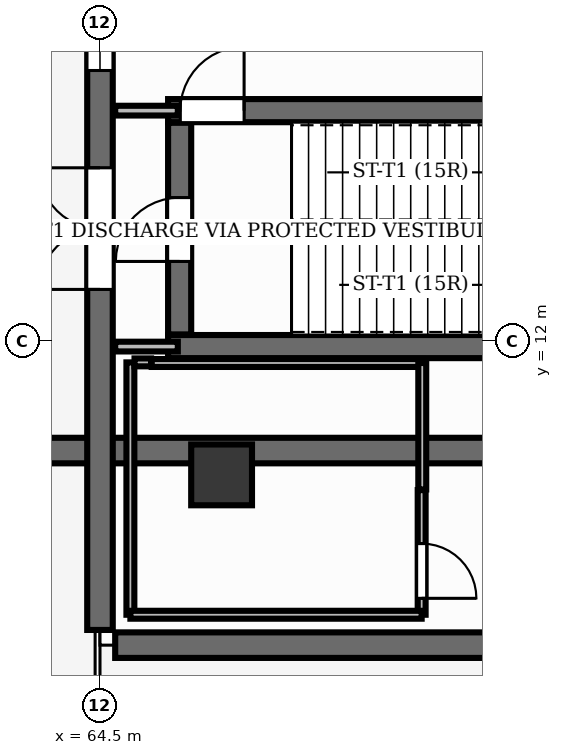
"""IFC4 building model, lengths in metres.
Left out: names, types, materials, properties, quantities, classifications, styles, units other than length and angle.
Written with IfcOpenShell. Run it as: python <this file> out.ifc"""

import sys

from ifc_helpers import new_model, si_unit, direction, frame, frame_2d, origin, origin_2d, place, context, subcontext, project, spatial, rectangle, extrude, element, fill, save


model = new_model("IFC4")
c1 = context("Model", 3, precision=1e-05, world=origin(), true_north=direction((0.0, 1.0)))
c2 = subcontext(c1, "Body", "Model", "MODEL_VIEW")
j1 = project(units=[si_unit("LENGTHUNIT", "METRE"), si_unit("PLANEANGLEUNIT", "RADIAN")], contexts=[c1])
p1 = place(None, origin())
s1 = spatial("IfcSite", under=j1, at=p1, CompositionType="ELEMENT")
p2 = place(p1, origin())
s2 = spatial("IfcBuilding", under=s1, at=p2, CompositionType="ELEMENT")
p3 = place(p2, origin())
s3 = spatial("IfcBuildingStorey", under=s2, at=p3, CompositionType="ELEMENT", Elevation=0.0)
p4 = place(p3, frame((54.35, 10.2, 0.0), z_axis=(0.0, 0.0, 1.0), x_axis=(1.0, 0.0, 0.0)))
e1 = element("IfcWall", 1, at=p4, inside=s3, PredefinedType="SHEAR", context=c2, shape_type="SweptSolid", body=[
    extrude(rectangle(XDim=10.07, YDim=0.42, at=frame_2d((5.035, 0.0))), origin(), (0.0, 0.0, 1.0), 3.8),
])
p5 = place(p3, frame((64.5, 10.2, 0.0), z_axis=(0.0, 0.0, 1.0), x_axis=(1.0, 0.0, 0.0)))
e2 = element("IfcWall", 2, at=p5, inside=s3, PredefinedType="SHEAR", context=c2, shape_type="SweptSolid", body=[
    extrude(rectangle(XDim=27.4, YDim=0.42, at=frame_2d((13.7, 0.0))), origin(), (0.0, 0.0, 1.0), 3.8),
])
p6 = place(p3, frame((66.5, 9.8, 0.0), z_axis=(0.0, 0.0, 1.0), x_axis=(1.0, 0.0, 0.0)))
e3 = element("IfcColumn", 3, at=p6, inside=s3, PredefinedType="COLUMN", context=c2, shape_type="SweptSolid", body=[
    extrude(rectangle(XDim=1.0, YDim=1.0, at=origin_2d()), origin(), (0.0, 0.0, 1.0), 5.1),
])
p7 = place(p3, frame((64.5, 7.25, 0.0), z_axis=(0.0, 0.0, 1.0), x_axis=(0.0, 1.0, 0.0)))
e4 = element("IfcWall", 4, at=p7, inside=s3, PredefinedType="SHEAR", context=c2, shape_type="SweptSolid", body=[
    extrude(rectangle(XDim=39.5, YDim=0.42, at=frame_2d((19.75, 0.0))), origin(), (0.0, 0.0, 1.0), 5.1),
])
p8 = place(p7, frame((9.2, 0.0, 0.9)))
e5 = element("IfcOpeningElement", 5, at=p8, cuts=e4, PredefinedType="OPENING", context=c2, shape_type="SweptSolid", body=[
    extrude(rectangle(XDim=1.2, YDim=2.7, at=frame_2d((0.6, 1.35))), frame((0.0, 0.225, 0.0), z_axis=(0.0, -1.0, 0.0), x_axis=(1.0, 0.0, 0.0)), (0.0, 0.0, 1.0), 0.45),
])
p9 = place(p7, frame((12.6, 0.0, 0.9)))
e6 = element("IfcOpeningElement", 6, at=p9, cuts=e4, PredefinedType="OPENING", context=c2, shape_type="SweptSolid", body=[
    extrude(rectangle(XDim=1.2, YDim=2.7, at=frame_2d((0.6, 1.35))), frame((0.0, 0.225, 0.0), z_axis=(0.0, -1.0, 0.0), x_axis=(1.0, 0.0, 0.0)), (0.0, 0.0, 1.0), 0.45),
])
p10 = place(p7, frame((24.8, 0.0, 0.9)))
e7 = element("IfcOpeningElement", 7, at=p10, cuts=e4, PredefinedType="OPENING", context=c2, shape_type="SweptSolid", body=[
    extrude(rectangle(XDim=1.2, YDim=2.7, at=frame_2d((0.6, 1.35))), frame((0.0, 0.225, 0.0), z_axis=(0.0, -1.0, 0.0), x_axis=(1.0, 0.0, 0.0)), (0.0, 0.0, 1.0), 0.45),
])
p11 = place(p7, frame((36.2, 0.0, 0.9)))
e8 = element("IfcOpeningElement", 8, at=p11, cuts=e4, PredefinedType="OPENING", context=c2, shape_type="SweptSolid", body=[
    extrude(rectangle(XDim=1.2, YDim=2.7, at=frame_2d((0.6, 1.35))), frame((0.0, 0.225, 0.0), z_axis=(0.0, -1.0, 0.0), x_axis=(1.0, 0.0, 0.0)), (0.0, 0.0, 1.0), 0.45),
])
p12 = place(p7, frame((15.4, 0.0, 0.0)))
e9 = element("IfcOpeningElement", 9, at=p12, cuts=e4, PredefinedType="OPENING", context=c2, shape_type="SweptSolid", body=[
    extrude(rectangle(XDim=2.4, YDim=2.7, at=frame_2d((1.2, 1.35))), frame((0.0, 0.225, 0.0), z_axis=(0.0, -1.0, 0.0), x_axis=(1.0, 0.0, 0.0)), (0.0, 0.0, 1.0), 0.45),
])
p13 = place(p7, frame((21.6, 0.0, 0.0)))
e10 = element("IfcOpeningElement", 10, at=p13, cuts=e4, PredefinedType="OPENING", context=c2, shape_type="SweptSolid", body=[
    extrude(rectangle(XDim=2.4, YDim=2.7, at=frame_2d((1.2, 1.35))), frame((0.0, 0.225, 0.0), z_axis=(0.0, -1.0, 0.0), x_axis=(1.0, 0.0, 0.0)), (0.0, 0.0, 1.0), 0.45),
])
p14 = place(p7, frame((5.6, 0.0, 0.0)))
e11 = element("IfcOpeningElement", 11, at=p14, cuts=e4, PredefinedType="OPENING", context=c2, shape_type="SweptSolid", body=[
    extrude(rectangle(XDim=2.0, YDim=2.3, at=frame_2d((1.0, 1.15))), frame((0.0, 0.225, 0.0), z_axis=(0.0, -1.0, 0.0), x_axis=(1.0, 0.0, 0.0)), (0.0, 0.0, 1.0), 0.45),
])
p15 = place(p7, frame((31.9, 0.0, 0.0)))
e12 = element("IfcOpeningElement", 12, at=p15, cuts=e4, PredefinedType="OPENING", context=c2, shape_type="SweptSolid", body=[
    extrude(rectangle(XDim=2.0, YDim=2.3, at=frame_2d((1.0, 1.15))), frame((0.0, 0.225, 0.0), z_axis=(0.0, -1.0, 0.0), x_axis=(1.0, 0.0, 0.0)), (0.0, 0.0, 1.0), 0.45),
])
p16 = place(p3, frame((94.25, 7.0, 0.0), z_axis=(0.0, 0.0, 1.0), x_axis=(-1.0, 0.0, 0.0)))
e13 = element("IfcWall", 13, at=p16, inside=s3, PredefinedType="SHEAR", context=c2, shape_type="SweptSolid", body=[
    extrude(rectangle(XDim=29.5, YDim=0.42, at=frame_2d((14.75, 0.0))), origin(), (0.0, 0.0, 1.0), 5.1),
])
p17 = place(p3, frame((65.62, 11.91, 0.0), z_axis=(0.0, 0.0, 1.0), x_axis=(1.0, 0.0, 0.0)))
e14 = element("IfcWall", 14, at=p17, inside=s3, PredefinedType="SHEAR", context=c2, shape_type="SweptSolid", body=[
    extrude(rectangle(XDim=8.61, YDim=0.38, at=frame_2d((4.305, 0.0))), origin(), (0.0, 0.0, 1.0), 5.1),
])
p18 = place(p3, frame((65.62, 15.79, 0.0), z_axis=(0.0, 0.0, 1.0), x_axis=(1.0, 0.0, 0.0)))
e15 = element("IfcWall", 15, at=p18, inside=s3, PredefinedType="SHEAR", context=c2, shape_type="SweptSolid", body=[
    extrude(rectangle(XDim=8.61, YDim=0.38, at=frame_2d((4.305, 0.0))), origin(), (0.0, 0.0, 1.0), 5.1),
])
p19 = place(p18, frame((0.2, 0.0, 0.0)))
e16 = element("IfcOpeningElement", 16, at=p19, cuts=e15, PredefinedType="OPENING", context=c2, shape_type="SweptSolid", body=[
    extrude(rectangle(XDim=1.05, YDim=2.15, at=frame_2d((0.525, 1.075))), frame((0.0, 0.205, 0.0), z_axis=(0.0, -1.0, 0.0), x_axis=(1.0, 0.0, 0.0)), (0.0, 0.0, 1.0), 0.41),
])
p20 = place(p3, frame((65.81, 12.11, 0.0), z_axis=(0.0, 0.0, 1.0), x_axis=(0.0, 1.0, 0.0)))
e17 = element("IfcWall", 17, at=p20, inside=s3, PredefinedType="SHEAR", context=c2, shape_type="SweptSolid", body=[
    extrude(rectangle(XDim=3.48, YDim=0.38, at=frame_2d((1.74, 0.0))), origin(), (0.0, 0.0, 1.0), 5.1),
])
p21 = place(p20, frame((1.2, 0.0, 0.0)))
e18 = element("IfcOpeningElement", 18, at=p21, cuts=e17, PredefinedType="OPENING", context=c2, shape_type="SweptSolid", body=[
    extrude(rectangle(XDim=1.05, YDim=2.15, at=frame_2d((0.525, 1.075))), frame((0.0, 0.205, 0.0), z_axis=(0.0, -1.0, 0.0), x_axis=(1.0, 0.0, 0.0)), (0.0, 0.0, 1.0), 0.41),
])
for number, where, z_axis, x_axis in (
    (19, (64.75, 15.79, 0.0), (0.0, 0.0, 1.0), (1.0, 0.0, 0.0)),
    (20, (64.75, 11.91, 0.0), (0.0, 0.0, 1.0), (1.0, 0.0, 0.0)),
):
    element("IfcWall", number, at=place(p3, frame(where, z_axis=z_axis, x_axis=x_axis)), inside=s3, PredefinedType="PARTITIONING", context=c2, shape_type="SweptSolid", body=[
        extrude(rectangle(XDim=1.03, YDim=0.16, at=frame_2d((0.515, 0.0))), origin(), (0.0, 0.0, 1.0), 4.11),
    ])
p22 = place(p3, frame((69.79, 9.55, 0.0), z_axis=(0.0, 0.0, 1.0), x_axis=(0.0, -1.0, 0.0)))
e21 = element("IfcWall", 21, at=p22, inside=s3, PredefinedType="PARTITIONING", context=c2, shape_type="SweptSolid", body=[
    extrude(rectangle(XDim=2.05, YDim=0.13, at=frame_2d((1.025, 0.0))), origin(), (0.0, 0.0, 1.0), 4.11),
])
p23 = place(p22, frame((0.88, 0.0, 0.0)))
e22 = element("IfcOpeningElement", 22, at=p23, cuts=e21, PredefinedType="OPENING", context=c2, shape_type="SweptSolid", body=[
    extrude(rectangle(XDim=0.9, YDim=2.15, at=frame_2d((0.45, 1.075))), frame((0.0, 0.08, 0.0), z_axis=(0.0, -1.0, 0.0), x_axis=(1.0, 0.0, 0.0)), (0.0, 0.0, 1.0), 0.16),
])
p24 = place(p3, frame((65.0, 7.5, 0.0), z_axis=(0.0, 0.0, 1.0), x_axis=(0.0, 1.0, 0.0)))
e23 = element("IfcWall", 23, at=p24, inside=s3, PredefinedType="PARTITIONING", context=c2, shape_type="SweptSolid", body=[
    extrude(rectangle(XDim=4.15, YDim=0.13, at=frame_2d((2.075, 0.0))), origin(), (0.0, 0.0, 1.0), 4.11),
])
p25 = place(p3, frame((65.068, 11.65, 0.0), z_axis=(0.0, 0.0, 1.0), x_axis=(1.0, 0.0, 0.0)))
e24 = element("IfcWall", 24, at=p25, inside=s3, PredefinedType="PARTITIONING", context=c2, shape_type="SweptSolid", body=[
    extrude(rectangle(XDim=0.272, YDim=0.13, at=frame_2d((0.136, 0.0))), origin(), (0.0, 0.0, 1.0), 4.11),
])
p26 = place(p3, frame((65.35, 11.64, 0.0), z_axis=(0.0, 0.0, 1.0), x_axis=(1.0, 0.0, 0.0)))
e25 = element("IfcWall", 25, at=p26, inside=s3, PredefinedType="PARTITIONING", context=c2, shape_type="SweptSolid", body=[
    extrude(rectangle(XDim=4.45, YDim=0.13, at=frame_2d((2.225, 0.0))), origin(), (0.0, 0.0, 1.0), 4.11),
])
p27 = place(p3, frame((69.8, 11.64, 0.0), z_axis=(0.0, 0.0, 1.0), x_axis=(0.0, -1.0, 0.0)))
e26 = element("IfcWall", 26, at=p27, inside=s3, PredefinedType="PARTITIONING", context=c2, shape_type="SweptSolid", body=[
    extrude(rectangle(XDim=2.08, YDim=0.13, at=frame_2d((1.04, 0.0))), origin(), (0.0, 0.0, 1.0), 4.11),
])
p28 = place(p3, frame((69.79, 7.5, 0.0), z_axis=(0.0, 0.0, 1.0), x_axis=(-1.0, 0.0, 0.0)))
e27 = element("IfcWall", 27, at=p28, inside=s3, PredefinedType="PARTITIONING", context=c2, shape_type="SweptSolid", body=[
    extrude(rectangle(XDim=4.79, YDim=0.13, at=frame_2d((2.395, 0.0))), origin(), (0.0, 0.0, 1.0), 4.11),
])
p29 = place(p8, origin())
e28 = element("IfcWindow", 28, at=p29, inside=s3, PartitioningType="SINGLE_PANEL", PredefinedType="WINDOW", context=c2, shape_type="SweptSolid", body=[
    extrude(rectangle(XDim=1.2, YDim=2.7, at=frame_2d((0.6, 1.35))), frame((0.0, 0.03, 0.0), z_axis=(0.0, -1.0, 0.0), x_axis=(1.0, 0.0, 0.0)), (0.0, 0.0, 1.0), 0.06),
])
fill(e5, e28)
p30 = place(p14, origin())
e29 = element("IfcDoor", 29, at=p30, inside=s3, OperationType="DOUBLE_DOOR_SINGLE_SWING", PredefinedType="DOOR", context=c2, shape_type="SweptSolid", body=[
    extrude(rectangle(XDim=2.0, YDim=2.3, at=frame_2d((1.0, 1.15))), frame((0.0, 0.025, 0.0), z_axis=(0.0, -1.0, 0.0), x_axis=(1.0, 0.0, 0.0)), (0.0, 0.0, 1.0), 0.05),
])
fill(e11, e29)
p31 = place(p19, origin())
e30 = element("IfcDoor", 30, at=p31, inside=s3, OperationType="SINGLE_SWING_RIGHT", PredefinedType="DOOR", context=c2, shape_type="SweptSolid", body=[
    extrude(rectangle(XDim=1.05, YDim=2.15, at=frame_2d((0.525, 1.075))), frame((0.0, 0.025, 0.0), z_axis=(0.0, -1.0, 0.0), x_axis=(1.0, 0.0, 0.0)), (0.0, 0.0, 1.0), 0.05),
])
fill(e16, e30)
p32 = place(p21, origin())
e31 = element("IfcDoor", 31, at=p32, inside=s3, OperationType="SINGLE_SWING_LEFT", PredefinedType="DOOR", context=c2, shape_type="SweptSolid", body=[
    extrude(rectangle(XDim=1.05, YDim=2.15, at=frame_2d((0.525, 1.075))), frame((0.0, 0.025, 0.0), z_axis=(0.0, -1.0, 0.0), x_axis=(1.0, 0.0, 0.0)), (0.0, 0.0, 1.0), 0.05),
])
fill(e18, e31)
p33 = place(p23, origin())
e32 = element("IfcDoor", 32, at=p33, inside=s3, OperationType="SINGLE_SWING_RIGHT", PredefinedType="DOOR", context=c2, shape_type="SweptSolid", body=[
    extrude(rectangle(XDim=0.9, YDim=2.15, at=frame_2d((0.45, 1.075))), frame((0.0, 0.025, 0.0), z_axis=(0.0, -1.0, 0.0), x_axis=(1.0, 0.0, 0.0)), (0.0, 0.0, 1.0), 0.05),
])
fill(e22, e32)
save(model, sys.argv[1])
